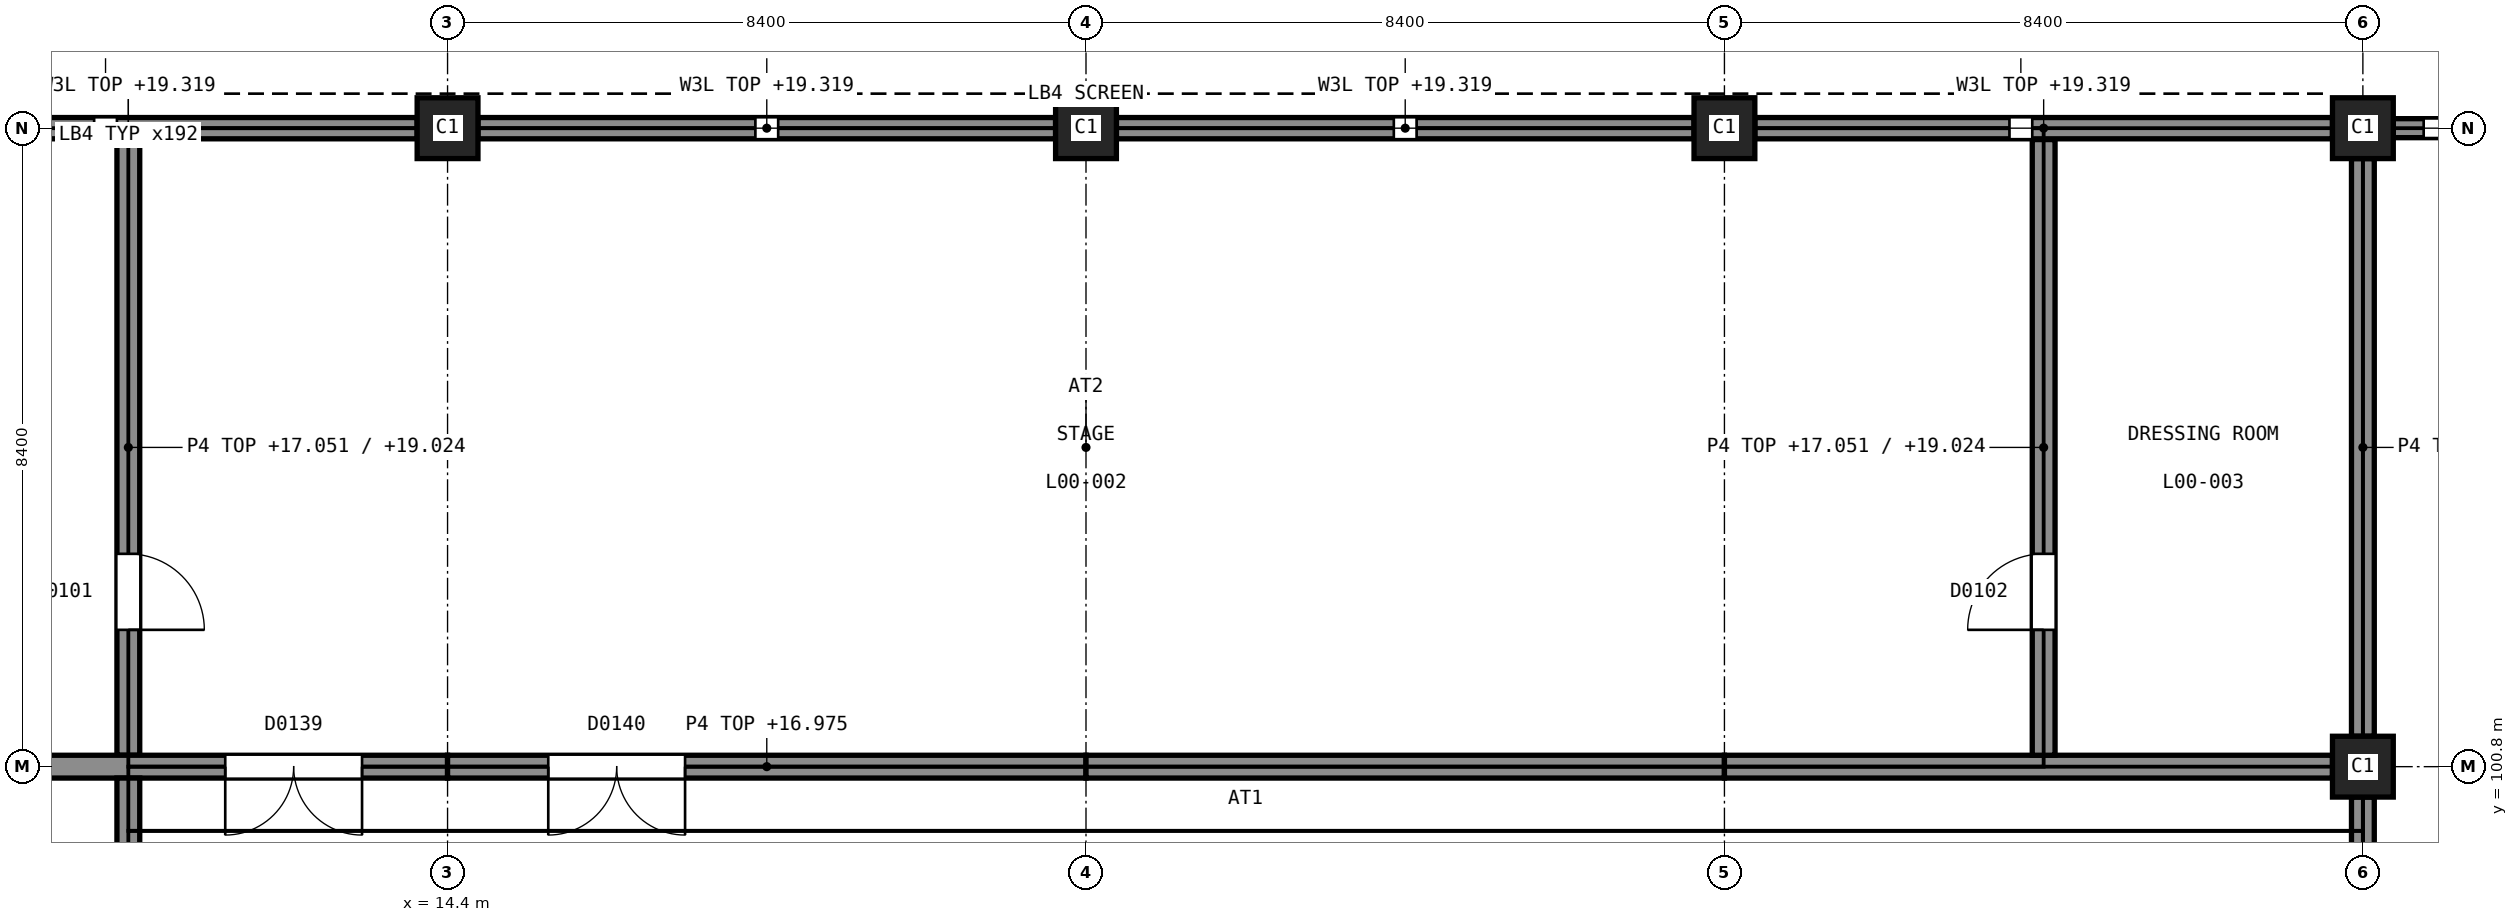
"""IFC4 building model, lengths in metres.
Left out: names, types, materials, properties, quantities, classifications, styles, units other than length and angle.
Written with IfcOpenShell. Run it as: python <this file> out.ifc"""

import sys

from ifc_helpers import new_model, si_unit, direction, frame, frame_2d, origin, origin_2d, place, context, subcontext, project, spatial, polyline, rectangle, outline, extrude, element, fill, save


model = new_model("IFC4")
c1 = context("Model", 3, precision=1e-05, world=origin(), true_north=direction((0.0, 1.0)))
c2 = subcontext(c1, "Body", "Model", "MODEL_VIEW")
j1 = project(units=[si_unit("LENGTHUNIT", "METRE"), si_unit("PLANEANGLEUNIT", "RADIAN")], contexts=[c1])
p1 = place(None, origin())
s1 = spatial("IfcSite", under=j1, at=p1, CompositionType="ELEMENT")
p2 = place(p1, origin())
s2 = spatial("IfcBuilding", under=s1, at=p2, CompositionType="ELEMENT")
p3 = place(p2, origin())
s3 = spatial("IfcBuildingStorey", under=s2, at=p3, CompositionType="ELEMENT", Elevation=0.0)
for number, where, z_axis, x_axis in (
    (1, (14.4, 109.2, -0.3), (0.0, 0.0, 1.0), (1.0, 0.0, 0.0)),
    (2, (22.8, 109.2, -0.3), (0.0, 0.0, 1.0), (1.0, 0.0, 0.0)),
    (3, (31.2, 109.2, -0.3), (0.0, 0.0, 1.0), (1.0, 0.0, 0.0)),
    (4, (39.6, 100.8, -0.3), (0.0, 0.0, 1.0), (1.0, 0.0, 0.0)),
    (5, (39.6, 109.2, -0.3), (0.0, 0.0, 1.0), (1.0, 0.0, 0.0)),
):
    element("IfcColumn", number, at=place(p3, frame(where, z_axis=z_axis, x_axis=x_axis)), inside=s3, PredefinedType="COLUMN", context=c2, shape_type="SweptSolid", body=[
        extrude(rectangle(XDim=0.8, YDim=0.8, at=origin_2d()), origin(), (0.0, 0.0, 1.0), 5.8),
    ])
p4 = place(p3, frame((40.0, 109.2, 0.0), z_axis=(0.0, 0.0, 1.0), x_axis=(1.0, 0.0, 0.0)))
e6 = element("IfcWall", 6, at=p4, inside=s3, PredefinedType="SOLIDWALL", context=c2, shape_type="SweptSolid", body=[
    extrude(rectangle(XDim=7.6, YDim=0.25, at=frame_2d((3.8, 0.0))), origin(), (0.0, 0.0, 1.0), 4.44),
])
p5 = place(p4, frame((0.4, 0.0, 0.9)))
e7 = element("IfcOpeningElement", 7, at=p5, cuts=e6, PredefinedType="OPENING", context=c2, shape_type="SweptSolid", body=[
    extrude(rectangle(XDim=1.2, YDim=2.1, at=frame_2d((0.6, 1.05))), frame((0.0, 0.135, 0.0), z_axis=(0.0, -1.0, 0.0), x_axis=(1.0, 0.0, 0.0)), (0.0, 0.0, 1.0), 0.27),
])
p6 = place(p4, frame((3.2, 0.0, 0.9)))
e8 = element("IfcOpeningElement", 8, at=p6, cuts=e6, PredefinedType="OPENING", context=c2, shape_type="SweptSolid", body=[
    extrude(rectangle(XDim=1.2, YDim=2.1, at=frame_2d((0.6, 1.05))), frame((0.0, 0.135, 0.0), z_axis=(0.0, -1.0, 0.0), x_axis=(1.0, 0.0, 0.0)), (0.0, 0.0, 1.0), 0.27),
])
p7 = place(p4, frame((6.0, 0.0, 0.9)))
e9 = element("IfcOpeningElement", 9, at=p7, cuts=e6, PredefinedType="OPENING", context=c2, shape_type="SweptSolid", body=[
    extrude(rectangle(XDim=1.2, YDim=2.1, at=frame_2d((0.6, 1.05))), frame((0.0, 0.135, 0.0), z_axis=(0.0, -1.0, 0.0), x_axis=(1.0, 0.0, 0.0)), (0.0, 0.0, 1.0), 0.27),
])
p8 = place(p3, frame((31.6, 109.2, 0.0), z_axis=(0.0, 0.0, 1.0), x_axis=(1.0, 0.0, 0.0)))
e10 = element("IfcWall", 10, at=p8, inside=s3, PredefinedType="SOLIDWALL", context=c2, shape_type="SweptSolid", body=[
    extrude(rectangle(XDim=7.6, YDim=0.28, at=frame_2d((3.8, 0.0))), origin(), (0.0, 0.0, 1.0), 19.319),
])
p9 = place(p8, frame((3.35, 0.0, 1.2)))
e11 = element("IfcOpeningElement", 11, at=p9, cuts=e10, PredefinedType="OPENING", context=c2, shape_type="SweptSolid", body=[
    extrude(rectangle(XDim=0.3, YDim=3.0, at=frame_2d((0.15, 1.5))), frame((0.0, 0.15, 0.0), z_axis=(0.0, -1.0, 0.0), x_axis=(1.0, 0.0, 0.0)), (0.0, 0.0, 1.0), 0.3),
])
p10 = place(p3, frame((23.2, 109.2, 0.0), z_axis=(0.0, 0.0, 1.0), x_axis=(1.0, 0.0, 0.0)))
e12 = element("IfcWall", 12, at=p10, inside=s3, PredefinedType="SOLIDWALL", context=c2, shape_type="SweptSolid", body=[
    extrude(rectangle(XDim=7.6, YDim=0.28, at=frame_2d((3.8, 0.0))), origin(), (0.0, 0.0, 1.0), 19.319),
])
p11 = place(p10, frame((3.65, 0.0, 1.2)))
e13 = element("IfcOpeningElement", 13, at=p11, cuts=e12, PredefinedType="OPENING", context=c2, shape_type="SweptSolid", body=[
    extrude(rectangle(XDim=0.3, YDim=3.0, at=frame_2d((0.15, 1.5))), frame((0.0, 0.15, 0.0), z_axis=(0.0, -1.0, 0.0), x_axis=(1.0, 0.0, 0.0)), (0.0, 0.0, 1.0), 0.3),
])
p12 = place(p3, frame((14.8, 109.2, 0.0), z_axis=(0.0, 0.0, 1.0), x_axis=(1.0, 0.0, 0.0)))
e14 = element("IfcWall", 14, at=p12, inside=s3, PredefinedType="SOLIDWALL", context=c2, shape_type="SweptSolid", body=[
    extrude(rectangle(XDim=7.6, YDim=0.28, at=frame_2d((3.8, 0.0))), origin(), (0.0, 0.0, 1.0), 19.319),
])
p13 = place(p12, frame((3.65, 0.0, 1.2)))
e15 = element("IfcOpeningElement", 15, at=p13, cuts=e14, PredefinedType="OPENING", context=c2, shape_type="SweptSolid", body=[
    extrude(rectangle(XDim=0.3, YDim=3.0, at=frame_2d((0.15, 1.5))), frame((0.0, 0.15, 0.0), z_axis=(0.0, -1.0, 0.0), x_axis=(1.0, 0.0, 0.0)), (0.0, 0.0, 1.0), 0.3),
])
p14 = place(p3, frame((6.4, 109.2, 0.0), z_axis=(0.0, 0.0, 1.0), x_axis=(1.0, 0.0, 0.0)))
e16 = element("IfcWall", 16, at=p14, inside=s3, PredefinedType="SOLIDWALL", context=c2, shape_type="SweptSolid", body=[
    extrude(rectangle(XDim=7.6, YDim=0.28, at=frame_2d((3.8, 0.0))), origin(), (0.0, 0.0, 1.0), 19.319),
])
p15 = place(p14, frame((3.35, 0.0, 1.2)))
e17 = element("IfcOpeningElement", 17, at=p15, cuts=e16, PredefinedType="OPENING", context=c2, shape_type="SweptSolid", body=[
    extrude(rectangle(XDim=0.3, YDim=3.0, at=frame_2d((0.15, 1.5))), frame((0.0, 0.15, 0.0), z_axis=(0.0, -1.0, 0.0), x_axis=(1.0, 0.0, 0.0)), (0.0, 0.0, 1.0), 0.3),
])
p16 = place(p3, frame((10.2, 100.95, 0.0), z_axis=(0.0, 0.0, 1.0), x_axis=(0.0, 1.0, 0.0)))
e18 = element("IfcWall", 18, at=p16, inside=s3, PredefinedType="PARTITIONING", context=c2, shape_type="SweptSolid", body=[
    extrude(outline(polyline([(0.0, 0.0), (8.1, 0.0), (8.1, 19.024), (7.35, 18.872), (6.3, 18.607), (4.2, 18.075), (3.15, 17.81), (2.1, 17.544), (1.05, 17.279), (0.0, 17.051), (0.0, 0.0)])), frame((0.0, 0.15, 0.0), z_axis=(0.0, -1.0, 0.0), x_axis=(1.0, 0.0, 0.0)), (0.0, 0.0, 1.0), 0.3),
])
p17 = place(p16, frame((1.65, 0.0, 0.0)))
e19 = element("IfcOpeningElement", 19, at=p17, cuts=e18, PredefinedType="OPENING", context=c2, shape_type="SweptSolid", body=[
    extrude(rectangle(XDim=1.0, YDim=2.1, at=frame_2d((0.5, 1.05))), frame((0.0, 0.16, 0.0), z_axis=(0.0, -1.0, 0.0), x_axis=(1.0, 0.0, 0.0)), (0.0, 0.0, 1.0), 0.32),
])
p18 = place(p3, frame((6.4, 100.8, 0.0), z_axis=(0.0, 0.0, 1.0), x_axis=(1.0, 0.0, 0.0)))
e20 = element("IfcWall", 20, at=p18, inside=s3, PredefinedType="PARTITIONING", context=c2, shape_type="SweptSolid", body=[
    extrude(rectangle(XDim=8.0, YDim=0.3, at=frame_2d((4.0, 0.0))), origin(), (0.0, 0.0, 1.0), 16.975),
])
p19 = place(p18, frame((5.075, 0.0, 0.0)))
e21 = element("IfcOpeningElement", 21, at=p19, cuts=e20, PredefinedType="OPENING", context=c2, shape_type="SweptSolid", body=[
    extrude(rectangle(XDim=1.8, YDim=2.1, at=frame_2d((0.9, 1.05))), frame((0.0, 0.16, 0.0), z_axis=(0.0, -1.0, 0.0), x_axis=(1.0, 0.0, 0.0)), (0.0, 0.0, 1.0), 0.32),
])
p20 = place(p3, frame((14.4, 100.8, 0.0), z_axis=(0.0, 0.0, 1.0), x_axis=(1.0, 0.0, 0.0)))
e22 = element("IfcWall", 22, at=p20, inside=s3, PredefinedType="PARTITIONING", context=c2, shape_type="SweptSolid", body=[
    extrude(rectangle(XDim=8.4, YDim=0.3, at=frame_2d((4.2, 0.0))), origin(), (0.0, 0.0, 1.0), 16.975),
])
p21 = place(p20, frame((1.325, 0.0, 0.0)))
e23 = element("IfcOpeningElement", 23, at=p21, cuts=e22, PredefinedType="OPENING", context=c2, shape_type="SweptSolid", body=[
    extrude(rectangle(XDim=1.8, YDim=2.1, at=frame_2d((0.9, 1.05))), frame((0.0, 0.16, 0.0), z_axis=(0.0, -1.0, 0.0), x_axis=(1.0, 0.0, 0.0)), (0.0, 0.0, 1.0), 0.32),
])
p22 = place(p3, frame((22.8, 100.8, 0.0), z_axis=(0.0, 0.0, 1.0), x_axis=(1.0, 0.0, 0.0)))
e24 = element("IfcWall", 24, at=p22, inside=s3, PredefinedType="PARTITIONING", context=c2, shape_type="SweptSolid", body=[
    extrude(rectangle(XDim=8.4, YDim=0.3, at=frame_2d((4.2, 0.0))), origin(), (0.0, 0.0, 1.0), 16.975),
])
p23 = place(p3, frame((31.2, 100.8, 0.0), z_axis=(0.0, 0.0, 1.0), x_axis=(1.0, 0.0, 0.0)))
e25 = element("IfcWall", 25, at=p23, inside=s3, PredefinedType="PARTITIONING", context=c2, shape_type="SweptSolid", body=[
    extrude(rectangle(XDim=8.0, YDim=0.3, at=frame_2d((4.0, 0.0))), origin(), (0.0, 0.0, 1.0), 16.975),
])
p24 = place(p3, frame((35.4, 100.95, 0.0), z_axis=(0.0, 0.0, 1.0), x_axis=(0.0, 1.0, 0.0)))
e26 = element("IfcWall", 26, at=p24, inside=s3, PredefinedType="PARTITIONING", context=c2, shape_type="SweptSolid", body=[
    extrude(outline(polyline([(0.0, 0.0), (8.1, 0.0), (8.1, 19.024), (7.35, 18.872), (6.3, 18.607), (4.2, 18.075), (3.15, 17.81), (2.1, 17.544), (1.05, 17.279), (0.0, 17.051), (0.0, 0.0)])), frame((0.0, 0.15, 0.0), z_axis=(0.0, -1.0, 0.0), x_axis=(1.0, 0.0, 0.0)), (0.0, 0.0, 1.0), 0.3),
])
p25 = place(p24, frame((1.65, 0.0, 0.0)))
e27 = element("IfcOpeningElement", 27, at=p25, cuts=e26, PredefinedType="OPENING", context=c2, shape_type="SweptSolid", body=[
    extrude(rectangle(XDim=1.0, YDim=2.1, at=frame_2d((0.5, 1.05))), frame((0.0, 0.16, 0.0), z_axis=(0.0, -1.0, 0.0), x_axis=(1.0, 0.0, 0.0)), (0.0, 0.0, 1.0), 0.32),
])
p26 = place(p3, frame((39.6, 101.2, 0.0), z_axis=(0.0, 0.0, 1.0), x_axis=(0.0, 1.0, 0.0)))
e28 = element("IfcWall", 28, at=p26, inside=s3, PredefinedType="PARTITIONING", context=c2, shape_type="SweptSolid", body=[
    extrude(rectangle(XDim=7.6, YDim=0.3, at=frame_2d((3.8, 0.0))), origin(), (0.0, 0.0, 1.0), 4.4),
])
p27 = place(p3, frame((39.6, 92.4, 0.0), z_axis=(0.0, 0.0, 1.0), x_axis=(0.0, 1.0, 0.0)))
e29 = element("IfcWall", 29, at=p27, inside=s3, PredefinedType="PARTITIONING", context=c2, shape_type="SweptSolid", body=[
    extrude(rectangle(XDim=8.0, YDim=0.3, at=frame_2d((4.0, 0.0))), origin(), (0.0, 0.0, 1.0), 4.4),
])
p28 = place(p27, frame((1.325, 0.0, 0.0)))
e30 = element("IfcOpeningElement", 30, at=p28, cuts=e29, PredefinedType="OPENING", context=c2, shape_type="SweptSolid", body=[
    extrude(rectangle(XDim=1.8, YDim=2.1, at=frame_2d((0.9, 1.05))), frame((0.0, 0.16, 0.0), z_axis=(0.0, -1.0, 0.0), x_axis=(1.0, 0.0, 0.0)), (0.0, 0.0, 1.0), 0.32),
])
p29 = place(p27, frame((5.075, 0.0, 0.0)))
e31 = element("IfcOpeningElement", 31, at=p29, cuts=e29, PredefinedType="OPENING", context=c2, shape_type="SweptSolid", body=[
    extrude(rectangle(XDim=1.8, YDim=2.1, at=frame_2d((0.9, 1.05))), frame((0.0, 0.16, 0.0), z_axis=(0.0, -1.0, 0.0), x_axis=(1.0, 0.0, 0.0)), (0.0, 0.0, 1.0), 0.32),
])
p30 = place(p3, frame((10.2, 92.4, 0.0), z_axis=(0.0, 0.0, 1.0), x_axis=(0.0, 1.0, 0.0)))
e32 = element("IfcWall", 32, at=p30, inside=s3, PredefinedType="PARTITIONING", context=c2, shape_type="SweptSolid", body=[
    extrude(outline(polyline([(0.0, 0.0), (8.25, 0.0), (8.25, 16.899), (7.35, 16.709), (6.3, 16.444), (5.25, 16.178), (4.2, 15.913), (2.1, 15.381), (1.05, 15.116), (0.0, 14.888), (0.0, 0.0)])), frame((0.0, 0.15, 0.0), z_axis=(0.0, -1.0, 0.0), x_axis=(1.0, 0.0, 0.0)), (0.0, 0.0, 1.0), 0.3),
])
p31 = place(p5, origin())
e33 = element("IfcWindow", 33, at=p31, inside=s3, PartitioningType="SINGLE_PANEL", PredefinedType="WINDOW", context=c2, shape_type="SweptSolid", body=[
    extrude(rectangle(XDim=1.2, YDim=2.1, at=frame_2d((0.6, 1.05))), frame((0.0, -0.045, 0.0), z_axis=(0.0, -1.0, 0.0), x_axis=(1.0, 0.0, 0.0)), (0.0, 0.0, 1.0), 0.06),
])
fill(e7, e33)
p32 = place(p9, origin())
e34 = element("IfcWindow", 34, at=p32, inside=s3, PartitioningType="SINGLE_PANEL", PredefinedType="WINDOW", context=c2, shape_type="SweptSolid", body=[
    extrude(rectangle(XDim=0.3, YDim=3.0, at=frame_2d((0.15, 1.5))), frame((0.0, -0.06, 0.0), z_axis=(0.0, -1.0, 0.0), x_axis=(1.0, 0.0, 0.0)), (0.0, 0.0, 1.0), 0.06),
])
fill(e11, e34)
p33 = place(p11, origin())
e35 = element("IfcWindow", 35, at=p33, inside=s3, PartitioningType="SINGLE_PANEL", PredefinedType="WINDOW", context=c2, shape_type="SweptSolid", body=[
    extrude(rectangle(XDim=0.3, YDim=3.0, at=frame_2d((0.15, 1.5))), frame((0.0, -0.06, 0.0), z_axis=(0.0, -1.0, 0.0), x_axis=(1.0, 0.0, 0.0)), (0.0, 0.0, 1.0), 0.06),
])
fill(e13, e35)
p34 = place(p13, origin())
e36 = element("IfcWindow", 36, at=p34, inside=s3, PartitioningType="SINGLE_PANEL", PredefinedType="WINDOW", context=c2, shape_type="SweptSolid", body=[
    extrude(rectangle(XDim=0.3, YDim=3.0, at=frame_2d((0.15, 1.5))), frame((0.0, -0.06, 0.0), z_axis=(0.0, -1.0, 0.0), x_axis=(1.0, 0.0, 0.0)), (0.0, 0.0, 1.0), 0.06),
])
fill(e15, e36)
p35 = place(p15, origin())
e37 = element("IfcWindow", 37, at=p35, inside=s3, PartitioningType="SINGLE_PANEL", PredefinedType="WINDOW", context=c2, shape_type="SweptSolid", body=[
    extrude(rectangle(XDim=0.3, YDim=3.0, at=frame_2d((0.15, 1.5))), frame((0.0, -0.06, 0.0), z_axis=(0.0, -1.0, 0.0), x_axis=(1.0, 0.0, 0.0)), (0.0, 0.0, 1.0), 0.06),
])
fill(e17, e37)
p36 = place(p17, origin())
e38 = element("IfcDoor", 38, at=p36, inside=s3, OperationType="SINGLE_SWING_LEFT", PredefinedType="DOOR", context=c2, shape_type="SweptSolid", body=[
    extrude(rectangle(XDim=1.0, YDim=2.1, at=frame_2d((0.5, 1.05))), frame((0.0, 0.025, 0.0), z_axis=(0.0, -1.0, 0.0), x_axis=(1.0, 0.0, 0.0)), (0.0, 0.0, 1.0), 0.05),
])
fill(e19, e38)
p37 = place(p25, origin())
e39 = element("IfcDoor", 39, at=p37, inside=s3, OperationType="SINGLE_SWING_RIGHT", PredefinedType="DOOR", context=c2, shape_type="SweptSolid", body=[
    extrude(rectangle(XDim=1.0, YDim=2.1, at=frame_2d((0.5, 1.05))), frame((0.0, 0.025, 0.0), z_axis=(0.0, -1.0, 0.0), x_axis=(1.0, 0.0, 0.0)), (0.0, 0.0, 1.0), 0.05),
])
fill(e27, e39)
p38 = place(p19, origin())
e40 = element("IfcDoor", 40, at=p38, inside=s3, OperationType="DOUBLE_DOOR_SINGLE_SWING", PredefinedType="DOOR", context=c2, shape_type="SweptSolid", body=[
    extrude(rectangle(XDim=1.8, YDim=2.1, at=frame_2d((0.9, 1.05))), frame((0.0, 0.025, 0.0), z_axis=(0.0, -1.0, 0.0), x_axis=(1.0, 0.0, 0.0)), (0.0, 0.0, 1.0), 0.05),
])
fill(e21, e40)
p39 = place(p21, origin())
e41 = element("IfcDoor", 41, at=p39, inside=s3, OperationType="DOUBLE_DOOR_SINGLE_SWING", PredefinedType="DOOR", context=c2, shape_type="SweptSolid", body=[
    extrude(rectangle(XDim=1.8, YDim=2.1, at=frame_2d((0.9, 1.05))), frame((0.0, 0.025, 0.0), z_axis=(0.0, -1.0, 0.0), x_axis=(1.0, 0.0, 0.0)), (0.0, 0.0, 1.0), 0.05),
])
fill(e23, e41)
save(model, sys.argv[1])
